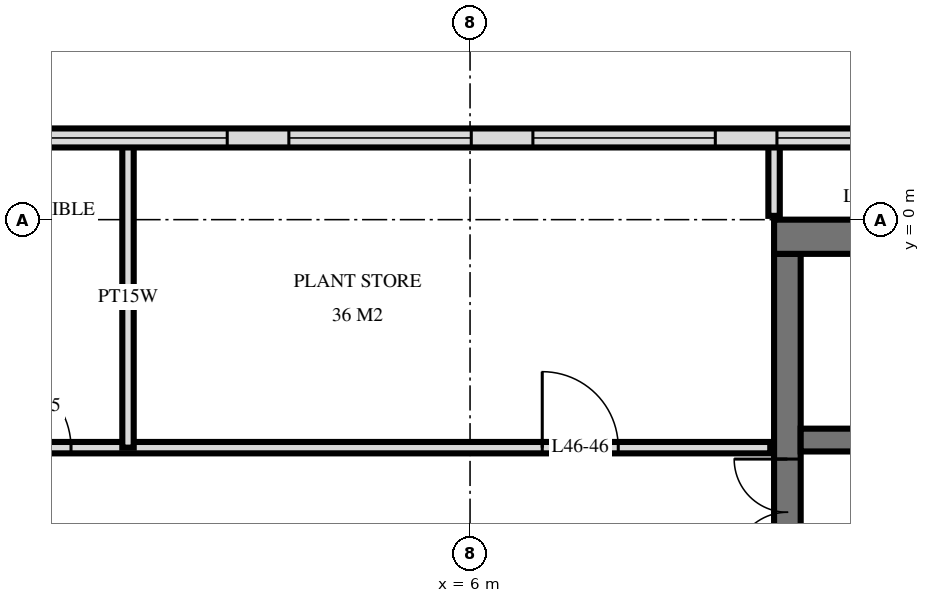
"""IFC4 building model, lengths in metres.
Left out: names, types, materials, properties, quantities, classifications, styles, units other than length and angle.
Written with IfcOpenShell. Run it as: python <this file> out.ifc"""

import sys

from ifc_helpers import new_model, si_unit, direction, frame, frame_2d, origin, place, context, subcontext, project, spatial, rectangle, extrude, element, fill, save


model = new_model("IFC4")
c1 = context("Model", 3, precision=1e-05, world=origin(), true_north=direction((0.0, 1.0)))
c2 = subcontext(c1, "Body", "Model", "MODEL_VIEW")
j1 = project(units=[si_unit("LENGTHUNIT", "METRE"), si_unit("PLANEANGLEUNIT", "RADIAN")], contexts=[c1])
p1 = place(None, origin())
s1 = spatial("IfcSite", under=j1, at=p1, CompositionType="ELEMENT")
p2 = place(p1, origin())
s2 = spatial("IfcBuilding", under=s1, at=p2, CompositionType="ELEMENT")
p3 = place(p2, frame((0.0, 0.0, 177.6)))
s3 = spatial("IfcBuildingStorey", under=s2, at=p3, CompositionType="ELEMENT", Elevation=177.6)
p4 = place(p3, frame((10.0, -0.225, 0.0), z_axis=(0.0, 0.0, 1.0), x_axis=(1.0, 0.0, 0.0)))
e1 = element("IfcWall", 1, at=p4, inside=s3, PredefinedType="SHEAR", context=c2, shape_type="SweptSolid", body=[
    extrude(rectangle(XDim=14.5, YDim=0.45, at=frame_2d((7.25, 0.0))), origin(), (0.0, 0.0, 1.0), 6.0),
])
p5 = place(p3, frame((10.175, -14.55, 0.0), z_axis=(0.0, 0.0, 1.0), x_axis=(0.0, 1.0, 0.0)))
e2 = element("IfcWall", 2, at=p5, inside=s3, PredefinedType="SHEAR", context=c2, shape_type="SweptSolid", body=[
    extrude(rectangle(XDim=14.1, YDim=0.35, at=frame_2d((7.05, 0.0))), origin(), (0.0, 0.0, 1.0), 6.0),
])
p6 = place(p5, frame((8.4, 0.0, 0.0)))
e3 = element("IfcOpeningElement", 3, at=p6, cuts=e2, PredefinedType="OPENING", context=c2, shape_type="SweptSolid", body=[
    extrude(rectangle(XDim=1.4, YDim=2.4, at=frame_2d((0.7, 1.2))), frame((0.0, 0.185, 0.0), z_axis=(0.0, -1.0, 0.0), x_axis=(1.0, 0.0, 0.0)), (0.0, 0.0, 1.0), 0.37),
])
p7 = place(p5, frame((10.0, 0.0, 0.0)))
e4 = element("IfcOpeningElement", 4, at=p7, cuts=e2, PredefinedType="OPENING", context=c2, shape_type="SweptSolid", body=[
    extrude(rectangle(XDim=1.4, YDim=2.4, at=frame_2d((0.7, 1.2))), frame((0.0, 0.185, 0.0), z_axis=(0.0, -1.0, 0.0), x_axis=(1.0, 0.0, 0.0)), (0.0, 0.0, 1.0), 0.37),
])
p8 = place(p5, frame((4.0, 0.0, 0.0)))
e5 = element("IfcOpeningElement", 5, at=p8, cuts=e2, PredefinedType="OPENING", context=c2, shape_type="SweptSolid", body=[
    extrude(rectangle(XDim=1.2, YDim=2.1, at=frame_2d((0.6, 1.05))), frame((0.0, 0.185, 0.0), z_axis=(0.0, -1.0, 0.0), x_axis=(1.0, 0.0, 0.0)), (0.0, 0.0, 1.0), 0.37),
])
p9 = place(p3, frame((10.35, -2.9, 0.0), z_axis=(0.0, 0.0, 1.0), x_axis=(1.0, 0.0, 0.0)))
e6 = element("IfcWall", 6, at=p9, inside=s3, PredefinedType="SHEAR", context=c2, shape_type="SweptSolid", body=[
    extrude(rectangle(XDim=13.7, YDim=0.3, at=frame_2d((6.85, 0.0))), origin(), (0.0, 0.0, 1.0), 6.0),
])
p10 = place(p9, frame((12.05, 0.0, 0.0)))
e7 = element("IfcOpeningElement", 7, at=p10, cuts=e6, PredefinedType="OPENING", context=c2, shape_type="SweptSolid", body=[
    extrude(rectangle(XDim=1.1, YDim=2.1, at=frame_2d((0.55, 1.05))), frame((0.0, 0.16, 0.0), z_axis=(0.0, -1.0, 0.0), x_axis=(1.0, 0.0, 0.0)), (0.0, 0.0, 1.0), 0.32),
])
p11 = place(p9, frame((6.9, 0.0, 0.0)))
e8 = element("IfcOpeningElement", 8, at=p11, cuts=e6, PredefinedType="OPENING", context=c2, shape_type="SweptSolid", body=[
    extrude(rectangle(XDim=0.9, YDim=2.1, at=frame_2d((0.45, 1.05))), frame((0.0, 0.16, 0.0), z_axis=(0.0, -1.0, 0.0), x_axis=(1.0, 0.0, 0.0)), (0.0, 0.0, 1.0), 0.32),
])
p12 = place(p9, frame((0.85, 0.0, 0.0)))
e9 = element("IfcOpeningElement", 9, at=p12, cuts=e6, PredefinedType="OPENING", context=c2, shape_type="SweptSolid", body=[
    extrude(rectangle(XDim=1.0, YDim=2.1, at=frame_2d((0.5, 1.05))), frame((0.0, 0.16, 0.0), z_axis=(0.0, -1.0, 0.0), x_axis=(1.0, 0.0, 0.0)), (0.0, 0.0, 1.0), 0.32),
])
p13 = place(p9, frame((3.387, 0.0, 0.0)))
e10 = element("IfcOpeningElement", 10, at=p13, cuts=e6, PredefinedType="OPENING", context=c2, shape_type="SweptSolid", body=[
    extrude(rectangle(XDim=1.0, YDim=2.1, at=frame_2d((0.5, 1.05))), frame((0.0, 0.16, 0.0), z_axis=(0.0, -1.0, 0.0), x_axis=(1.0, 0.0, 0.0)), (0.0, 0.0, 1.0), 0.32),
])
p14 = place(p9, frame((4.812, 0.0, 0.0)))
e11 = element("IfcOpeningElement", 11, at=p14, cuts=e6, PredefinedType="OPENING", context=c2, shape_type="SweptSolid", body=[
    extrude(rectangle(XDim=1.0, YDim=2.1, at=frame_2d((0.5, 1.05))), frame((0.0, 0.16, 0.0), z_axis=(0.0, -1.0, 0.0), x_axis=(1.0, 0.0, 0.0)), (0.0, 0.0, 1.0), 0.32),
])
p15 = place(p9, frame((9.7, 0.0, 0.0)))
e12 = element("IfcOpeningElement", 12, at=p15, cuts=e6, PredefinedType="OPENING", context=c2, shape_type="SweptSolid", body=[
    extrude(rectangle(XDim=1.0, YDim=2.1, at=frame_2d((0.5, 1.05))), frame((0.0, 0.16, 0.0), z_axis=(0.0, -1.0, 0.0), x_axis=(1.0, 0.0, 0.0)), (0.0, 0.0, 1.0), 0.32),
])
p16 = place(p3, frame((22.475, 1.075, 0.0), z_axis=(0.0, 0.0, 1.0), x_axis=(-1.0, 0.0, 0.0)))
e13 = element("IfcWall", 13, at=p16, inside=s3, PredefinedType="SOLIDWALL", context=c2, shape_type="SweptSolid", body=[
    extrude(rectangle(XDim=44.951, YDim=0.25, at=frame_2d((22.475, 0.0))), origin(), (0.0, 0.0, 1.0), 5.72),
])
p17 = place(p16, frame((0.406, 0.0, 0.858)))
e14 = element("IfcOpeningElement", 14, at=p17, cuts=e13, PredefinedType="OPENING", context=c2, shape_type="SweptSolid", body=[
    extrude(rectangle(XDim=2.4, YDim=3.6, at=frame_2d((1.2, 1.8))), frame((0.0, 0.135, 0.0), z_axis=(0.0, -1.0, 0.0), x_axis=(1.0, 0.0, 0.0)), (0.0, 0.0, 1.0), 0.27),
])
p18 = place(p16, frame((3.616, 0.0, 0.858)))
e15 = element("IfcOpeningElement", 15, at=p18, cuts=e13, PredefinedType="OPENING", context=c2, shape_type="SweptSolid", body=[
    extrude(rectangle(XDim=2.4, YDim=3.6, at=frame_2d((1.2, 1.8))), frame((0.0, 0.135, 0.0), z_axis=(0.0, -1.0, 0.0), x_axis=(1.0, 0.0, 0.0)), (0.0, 0.0, 1.0), 0.27),
])
p19 = place(p16, frame((6.827, 0.0, 0.858)))
e16 = element("IfcOpeningElement", 16, at=p19, cuts=e13, PredefinedType="OPENING", context=c2, shape_type="SweptSolid", body=[
    extrude(rectangle(XDim=2.4, YDim=3.6, at=frame_2d((1.2, 1.8))), frame((0.0, 0.135, 0.0), z_axis=(0.0, -1.0, 0.0), x_axis=(1.0, 0.0, 0.0)), (0.0, 0.0, 1.0), 0.27),
])
p20 = place(p16, frame((10.038, 0.0, 0.858)))
e17 = element("IfcOpeningElement", 17, at=p20, cuts=e13, PredefinedType="OPENING", context=c2, shape_type="SweptSolid", body=[
    extrude(rectangle(XDim=2.4, YDim=3.6, at=frame_2d((1.2, 1.8))), frame((0.0, 0.135, 0.0), z_axis=(0.0, -1.0, 0.0), x_axis=(1.0, 0.0, 0.0)), (0.0, 0.0, 1.0), 0.27),
])
p21 = place(p16, frame((13.249, 0.0, 0.858)))
e18 = element("IfcOpeningElement", 18, at=p21, cuts=e13, PredefinedType="OPENING", context=c2, shape_type="SweptSolid", body=[
    extrude(rectangle(XDim=2.4, YDim=3.6, at=frame_2d((1.2, 1.8))), frame((0.0, 0.135, 0.0), z_axis=(0.0, -1.0, 0.0), x_axis=(1.0, 0.0, 0.0)), (0.0, 0.0, 1.0), 0.27),
])
p22 = place(p16, frame((16.459, 0.0, 0.858)))
e19 = element("IfcOpeningElement", 19, at=p22, cuts=e13, PredefinedType="OPENING", context=c2, shape_type="SweptSolid", body=[
    extrude(rectangle(XDim=2.4, YDim=3.6, at=frame_2d((1.2, 1.8))), frame((0.0, 0.135, 0.0), z_axis=(0.0, -1.0, 0.0), x_axis=(1.0, 0.0, 0.0)), (0.0, 0.0, 1.0), 0.27),
])
p23 = place(p16, frame((19.67, 0.0, 0.858)))
e20 = element("IfcOpeningElement", 20, at=p23, cuts=e13, PredefinedType="OPENING", context=c2, shape_type="SweptSolid", body=[
    extrude(rectangle(XDim=2.4, YDim=3.6, at=frame_2d((1.2, 1.8))), frame((0.0, 0.135, 0.0), z_axis=(0.0, -1.0, 0.0), x_axis=(1.0, 0.0, 0.0)), (0.0, 0.0, 1.0), 0.27),
])
p24 = place(p16, frame((22.881, 0.0, 0.858)))
e21 = element("IfcOpeningElement", 21, at=p24, cuts=e13, PredefinedType="OPENING", context=c2, shape_type="SweptSolid", body=[
    extrude(rectangle(XDim=2.4, YDim=3.6, at=frame_2d((1.2, 1.8))), frame((0.0, 0.135, 0.0), z_axis=(0.0, -1.0, 0.0), x_axis=(1.0, 0.0, 0.0)), (0.0, 0.0, 1.0), 0.27),
])
p25 = place(p16, frame((26.092, 0.0, 0.858)))
e22 = element("IfcOpeningElement", 22, at=p25, cuts=e13, PredefinedType="OPENING", context=c2, shape_type="SweptSolid", body=[
    extrude(rectangle(XDim=2.4, YDim=3.6, at=frame_2d((1.2, 1.8))), frame((0.0, 0.135, 0.0), z_axis=(0.0, -1.0, 0.0), x_axis=(1.0, 0.0, 0.0)), (0.0, 0.0, 1.0), 0.27),
])
p26 = place(p16, frame((29.302, 0.0, 0.858)))
e23 = element("IfcOpeningElement", 23, at=p26, cuts=e13, PredefinedType="OPENING", context=c2, shape_type="SweptSolid", body=[
    extrude(rectangle(XDim=2.4, YDim=3.6, at=frame_2d((1.2, 1.8))), frame((0.0, 0.135, 0.0), z_axis=(0.0, -1.0, 0.0), x_axis=(1.0, 0.0, 0.0)), (0.0, 0.0, 1.0), 0.27),
])
p27 = place(p16, frame((32.513, 0.0, 0.858)))
e24 = element("IfcOpeningElement", 24, at=p27, cuts=e13, PredefinedType="OPENING", context=c2, shape_type="SweptSolid", body=[
    extrude(rectangle(XDim=2.4, YDim=3.6, at=frame_2d((1.2, 1.8))), frame((0.0, 0.135, 0.0), z_axis=(0.0, -1.0, 0.0), x_axis=(1.0, 0.0, 0.0)), (0.0, 0.0, 1.0), 0.27),
])
p28 = place(p16, frame((35.724, 0.0, 0.858)))
e25 = element("IfcOpeningElement", 25, at=p28, cuts=e13, PredefinedType="OPENING", context=c2, shape_type="SweptSolid", body=[
    extrude(rectangle(XDim=2.4, YDim=3.6, at=frame_2d((1.2, 1.8))), frame((0.0, 0.135, 0.0), z_axis=(0.0, -1.0, 0.0), x_axis=(1.0, 0.0, 0.0)), (0.0, 0.0, 1.0), 0.27),
])
p29 = place(p16, frame((38.935, 0.0, 0.858)))
e26 = element("IfcOpeningElement", 26, at=p29, cuts=e13, PredefinedType="OPENING", context=c2, shape_type="SweptSolid", body=[
    extrude(rectangle(XDim=2.4, YDim=3.6, at=frame_2d((1.2, 1.8))), frame((0.0, 0.135, 0.0), z_axis=(0.0, -1.0, 0.0), x_axis=(1.0, 0.0, 0.0)), (0.0, 0.0, 1.0), 0.27),
])
p30 = place(p16, frame((42.146, 0.0, 0.858)))
e27 = element("IfcOpeningElement", 27, at=p30, cuts=e13, PredefinedType="OPENING", context=c2, shape_type="SweptSolid", body=[
    extrude(rectangle(XDim=2.4, YDim=3.6, at=frame_2d((1.2, 1.8))), frame((0.0, 0.135, 0.0), z_axis=(0.0, -1.0, 0.0), x_axis=(1.0, 0.0, 0.0)), (0.0, 0.0, 1.0), 0.27),
])
p31 = place(p3, frame((10.0, 0.05, 0.0), z_axis=(0.0, 0.0, 1.0), x_axis=(0.0, 1.0, 0.0)))
e28 = element("IfcWall", 28, at=p31, inside=s3, PredefinedType="PARTITIONING", context=c2, shape_type="SweptSolid", body=[
    extrude(rectangle(XDim=0.91, YDim=0.15, at=frame_2d((0.455, 0.0))), origin(), (0.0, 0.0, 1.0), 5.7),
])
p32 = place(p3, frame((1.5, -3.0, 0.0), z_axis=(0.0, 0.0, 1.0), x_axis=(0.0, 1.0, 0.0)))
e29 = element("IfcWall", 29, at=p32, inside=s3, PredefinedType="PLUMBINGWALL", context=c2, shape_type="SweptSolid", body=[
    extrude(rectangle(XDim=3.96, YDim=0.15, at=frame_2d((1.98, 0.0))), origin(), (0.0, 0.0, 1.0), 5.7),
])
p33 = place(p3, frame((-9.95, -3.0, 0.0), z_axis=(0.0, 0.0, 1.0), x_axis=(1.0, 0.0, 0.0)))
e30 = element("IfcWall", 30, at=p33, inside=s3, PredefinedType="PARTITIONING", context=c2, shape_type="SweptSolid", body=[
    extrude(rectangle(XDim=19.9, YDim=0.15, at=frame_2d((9.95, 0.0))), origin(), (0.0, 0.0, 1.0), 5.7),
])
p34 = place(p33, frame((2.0, 0.0, 0.0)))
e31 = element("IfcOpeningElement", 31, at=p34, cuts=e30, PredefinedType="OPENING", context=c2, shape_type="SweptSolid", body=[
    extrude(rectangle(XDim=1.0, YDim=2.1, at=frame_2d((0.5, 1.05))), frame((0.0, 0.085, 0.0), z_axis=(0.0, -1.0, 0.0), x_axis=(1.0, 0.0, 0.0)), (0.0, 0.0, 1.0), 0.17),
])
p35 = place(p33, frame((6.95, 0.0, 0.0)))
e32 = element("IfcOpeningElement", 32, at=p35, cuts=e30, PredefinedType="OPENING", context=c2, shape_type="SweptSolid", body=[
    extrude(rectangle(XDim=1.0, YDim=2.1, at=frame_2d((0.5, 1.05))), frame((0.0, 0.085, 0.0), z_axis=(0.0, -1.0, 0.0), x_axis=(1.0, 0.0, 0.0)), (0.0, 0.0, 1.0), 0.17),
])
p36 = place(p33, frame((9.7, 0.0, 0.0)))
e33 = element("IfcOpeningElement", 33, at=p36, cuts=e30, PredefinedType="OPENING", context=c2, shape_type="SweptSolid", body=[
    extrude(rectangle(XDim=1.0, YDim=2.1, at=frame_2d((0.5, 1.05))), frame((0.0, 0.085, 0.0), z_axis=(0.0, -1.0, 0.0), x_axis=(1.0, 0.0, 0.0)), (0.0, 0.0, 1.0), 0.17),
])
p37 = place(p33, frame((16.9, 0.0, 0.0)))
e34 = element("IfcOpeningElement", 34, at=p37, cuts=e30, PredefinedType="OPENING", context=c2, shape_type="SweptSolid", body=[
    extrude(rectangle(XDim=1.0, YDim=2.1, at=frame_2d((0.5, 1.05))), frame((0.0, 0.085, 0.0), z_axis=(0.0, -1.0, 0.0), x_axis=(1.0, 0.0, 0.0)), (0.0, 0.0, 1.0), 0.17),
])
p38 = place(p20, origin())
e35 = element("IfcWindow", 35, at=p38, inside=s3, PartitioningType="SINGLE_PANEL", PredefinedType="USERDEFINED", context=c2, shape_type="SweptSolid", body=[
    extrude(rectangle(XDim=2.4, YDim=3.6, at=frame_2d((1.2, 1.8))), frame((0.0, 0.03, 0.0), z_axis=(0.0, -1.0, 0.0), x_axis=(1.0, 0.0, 0.0)), (0.0, 0.0, 1.0), 0.06),
])
fill(e17, e35)
p39 = place(p21, origin())
e36 = element("IfcWindow", 36, at=p39, inside=s3, PartitioningType="SINGLE_PANEL", PredefinedType="USERDEFINED", context=c2, shape_type="SweptSolid", body=[
    extrude(rectangle(XDim=2.4, YDim=3.6, at=frame_2d((1.2, 1.8))), frame((0.0, 0.03, 0.0), z_axis=(0.0, -1.0, 0.0), x_axis=(1.0, 0.0, 0.0)), (0.0, 0.0, 1.0), 0.06),
])
fill(e18, e36)
p40 = place(p22, origin())
e37 = element("IfcWindow", 37, at=p40, inside=s3, PartitioningType="SINGLE_PANEL", PredefinedType="USERDEFINED", context=c2, shape_type="SweptSolid", body=[
    extrude(rectangle(XDim=2.4, YDim=3.6, at=frame_2d((1.2, 1.8))), frame((0.0, 0.03, 0.0), z_axis=(0.0, -1.0, 0.0), x_axis=(1.0, 0.0, 0.0)), (0.0, 0.0, 1.0), 0.06),
])
fill(e19, e37)
p41 = place(p23, origin())
e38 = element("IfcWindow", 38, at=p41, inside=s3, PartitioningType="SINGLE_PANEL", PredefinedType="USERDEFINED", context=c2, shape_type="SweptSolid", body=[
    extrude(rectangle(XDim=2.4, YDim=3.6, at=frame_2d((1.2, 1.8))), frame((0.0, 0.03, 0.0), z_axis=(0.0, -1.0, 0.0), x_axis=(1.0, 0.0, 0.0)), (0.0, 0.0, 1.0), 0.06),
])
fill(e20, e38)
p42 = place(p7, origin())
e39 = element("IfcDoor", 39, at=p42, inside=s3, OperationType="DOUBLE_DOOR_SINGLE_SWING", PredefinedType="DOOR", context=c2, shape_type="SweptSolid", body=[
    extrude(rectangle(XDim=1.4, YDim=2.4, at=frame_2d((0.7, 1.2))), frame((0.0, 0.025, 0.0), z_axis=(0.0, -1.0, 0.0), x_axis=(1.0, 0.0, 0.0)), (0.0, 0.0, 1.0), 0.05),
])
fill(e4, e39)
p43 = place(p36, origin())
e40 = element("IfcDoor", 40, at=p43, inside=s3, OperationType="SINGLE_SWING_RIGHT", PredefinedType="DOOR", context=c2, shape_type="SweptSolid", body=[
    extrude(rectangle(XDim=1.0, YDim=2.1, at=frame_2d((0.5, 1.05))), frame((0.0, 0.025, 0.0), z_axis=(0.0, -1.0, 0.0), x_axis=(1.0, 0.0, 0.0)), (0.0, 0.0, 1.0), 0.05),
])
fill(e33, e40)
p44 = place(p37, origin())
e41 = element("IfcDoor", 41, at=p44, inside=s3, OperationType="SINGLE_SWING_RIGHT", PredefinedType="DOOR", context=c2, shape_type="SweptSolid", body=[
    extrude(rectangle(XDim=1.0, YDim=2.1, at=frame_2d((0.5, 1.05))), frame((0.0, 0.025, 0.0), z_axis=(0.0, -1.0, 0.0), x_axis=(1.0, 0.0, 0.0)), (0.0, 0.0, 1.0), 0.05),
])
fill(e34, e41)
save(model, sys.argv[1])
